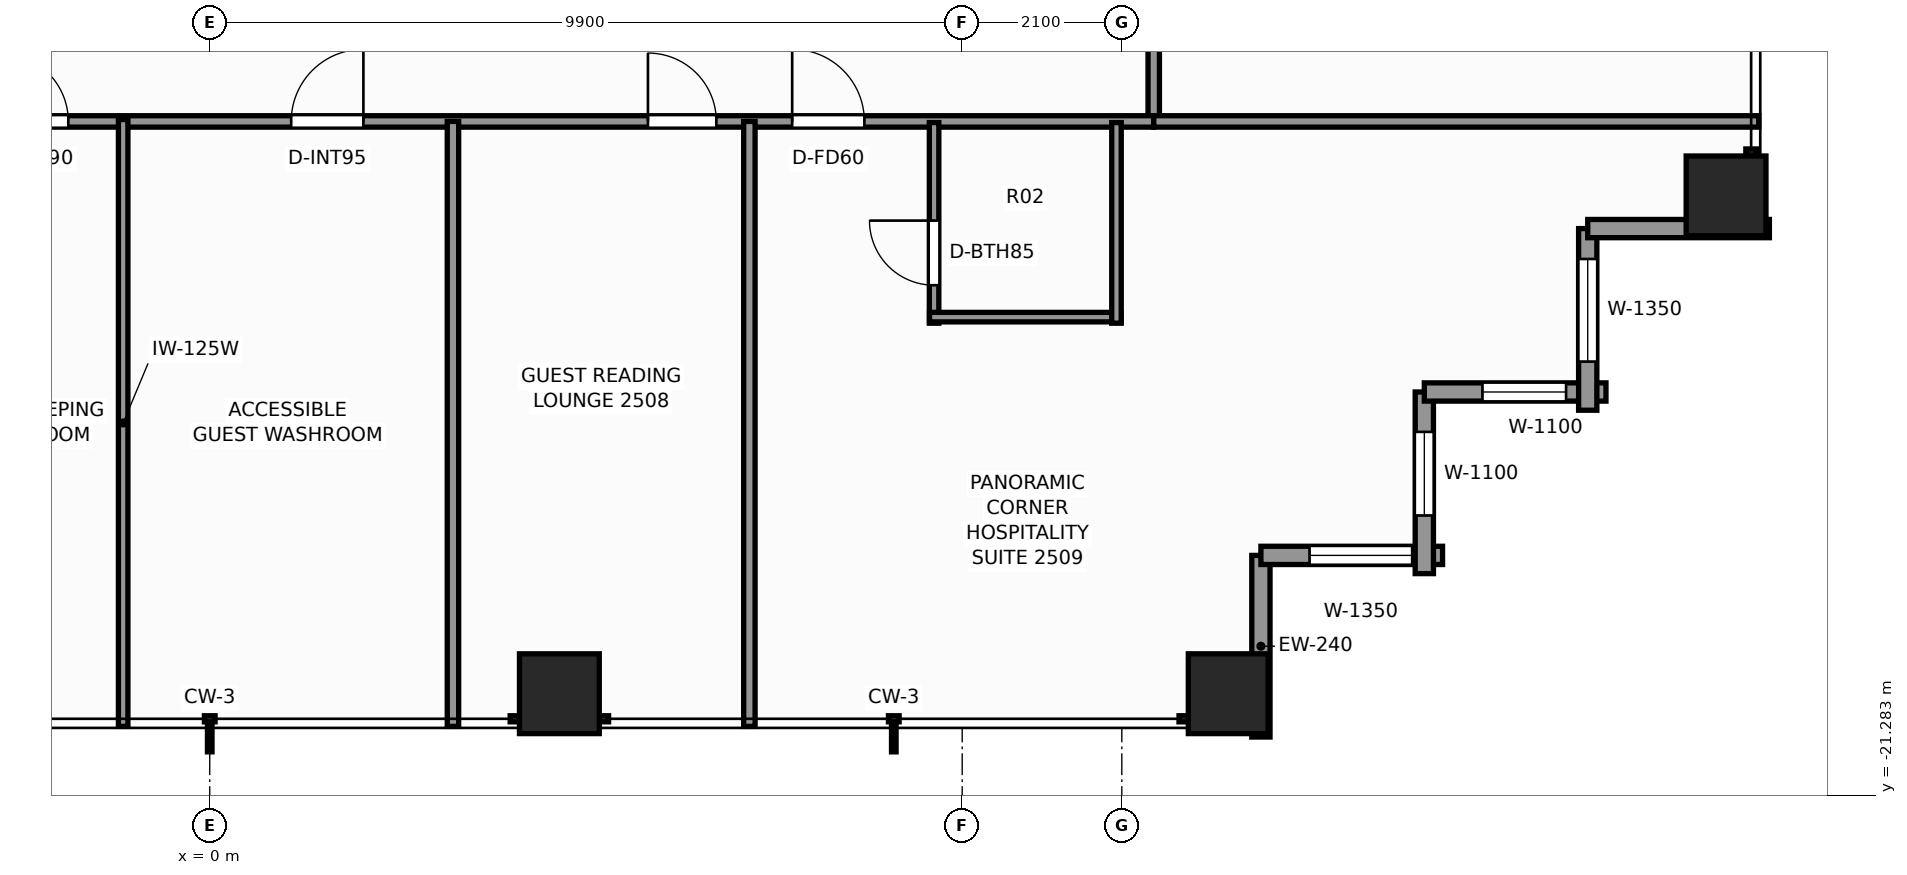
"""IFC4 building model, lengths in metres.
Left out: names, types, materials, properties, quantities, classifications, styles, units other than length and angle.
Written with IfcOpenShell. Run it as: python <this file> out.ifc"""

import sys

from ifc_helpers import new_model, si_unit, direction, frame, frame_2d, origin, origin_2d, place, context, subcontext, project, spatial, rectangle, extrude, element, fill, save


model = new_model("IFC4")
c1 = context("Model", 3, precision=1e-05, world=origin(), true_north=direction((0.0, 1.0)))
c2 = subcontext(c1, "Body", "Model", "MODEL_VIEW")
j1 = project(units=[si_unit("LENGTHUNIT", "METRE"), si_unit("PLANEANGLEUNIT", "RADIAN")], contexts=[c1])
p1 = place(None, origin())
s1 = spatial("IfcSite", under=j1, at=p1, CompositionType="ELEMENT")
p2 = place(p1, origin())
s2 = spatial("IfcBuilding", under=s1, at=p2, CompositionType="ELEMENT")
p3 = place(p2, frame((0.0, 0.0, 88.7)))
s3 = spatial("IfcBuildingStorey", under=s2, at=p3, CompositionType="ELEMENT", Elevation=88.7)
for number, where, z_axis, x_axis in (
    (1, (4.6, -19.95, 0.0), (0.0, 0.0, 1.0), (1.0, 0.0, 0.0)),
    (2, (13.4, -19.95, 0.0), (0.0, 0.0, 1.0), (1.0, 0.0, 0.0)),
    (3, (19.95, -13.4, 0.0), (0.0, 0.0, 1.0), (1.0, 0.0, 0.0)),
):
    element("IfcColumn", number, at=place(p3, frame(where, z_axis=z_axis, x_axis=x_axis)), inside=s3, PredefinedType="COLUMN", context=c2, shape_type="SweptSolid", body=[
        extrude(rectangle(XDim=1.05, YDim=1.05, at=origin_2d()), origin(), (0.0, 0.0, 1.0), 3.3),
    ])
p4 = place(p3, frame((13.83, -18.13, 0.0), z_axis=(0.0, 0.0, 1.0), x_axis=(0.0, -1.0, 0.0)))
e4 = element("IfcWall", 4, at=p4, inside=s3, PredefinedType="STANDARD", context=c2, shape_type="SweptSolid", body=[
    extrude(rectangle(XDim=2.39, YDim=0.24, at=frame_2d((1.195, 0.0))), origin(), (0.0, 0.0, 1.0), 2.459),
])
p5 = place(p3, frame((16.22, -18.13, 0.0), z_axis=(0.0, 0.0, 1.0), x_axis=(-1.0, 0.0, 0.0)))
e5 = element("IfcWall", 5, at=p5, inside=s3, PredefinedType="STANDARD", context=c2, shape_type="SweptSolid", body=[
    extrude(rectangle(XDim=2.39, YDim=0.24, at=frame_2d((1.195, 0.0))), origin(), (0.0, 0.0, 1.0), 2.459),
])
p6 = place(p5, frame((0.4, 0.0, 0.65)))
e6 = element("IfcOpeningElement", 6, at=p6, cuts=e5, PredefinedType="OPENING", context=c2, shape_type="SweptSolid", body=[
    extrude(rectangle(XDim=1.35, YDim=1.55, at=frame_2d((0.675, 0.775))), frame((0.0, 0.13, 0.0), z_axis=(0.0, -1.0, 0.0), x_axis=(1.0, 0.0, 0.0)), (0.0, 0.0, 1.0), 0.26),
])
p7 = place(p3, frame((15.98, -15.98, 0.0), z_axis=(0.0, 0.0, 1.0), x_axis=(0.0, -1.0, 0.0)))
e7 = element("IfcWall", 7, at=p7, inside=s3, PredefinedType="STANDARD", context=c2, shape_type="SweptSolid", body=[
    extrude(rectangle(XDim=2.39, YDim=0.24, at=frame_2d((1.195, 0.0))), origin(), (0.0, 0.0, 1.0), 2.459),
])
p8 = place(p7, frame((0.525, 0.0, 0.65)))
e8 = element("IfcOpeningElement", 8, at=p8, cuts=e7, PredefinedType="OPENING", context=c2, shape_type="SweptSolid", body=[
    extrude(rectangle(XDim=1.1, YDim=1.45, at=frame_2d((0.55, 0.725))), frame((0.0, 0.13, 0.0), z_axis=(0.0, -1.0, 0.0), x_axis=(1.0, 0.0, 0.0)), (0.0, 0.0, 1.0), 0.26),
])
p9 = place(p3, frame((18.37, -15.98, 0.0), z_axis=(0.0, 0.0, 1.0), x_axis=(-1.0, 0.0, 0.0)))
e9 = element("IfcWall", 9, at=p9, inside=s3, PredefinedType="STANDARD", context=c2, shape_type="SweptSolid", body=[
    extrude(rectangle(XDim=2.39, YDim=0.24, at=frame_2d((1.195, 0.0))), origin(), (0.0, 0.0, 1.0), 2.459),
])
p10 = place(p9, frame((0.525, 0.0, 0.65)))
e10 = element("IfcOpeningElement", 10, at=p10, cuts=e9, PredefinedType="OPENING", context=c2, shape_type="SweptSolid", body=[
    extrude(rectangle(XDim=1.1, YDim=1.45, at=frame_2d((0.55, 0.725))), frame((0.0, 0.13, 0.0), z_axis=(0.0, -1.0, 0.0), x_axis=(1.0, 0.0, 0.0)), (0.0, 0.0, 1.0), 0.26),
])
p11 = place(p3, frame((18.13, -13.83, 0.0), z_axis=(0.0, 0.0, 1.0), x_axis=(0.0, -1.0, 0.0)))
e11 = element("IfcWall", 11, at=p11, inside=s3, PredefinedType="STANDARD", context=c2, shape_type="SweptSolid", body=[
    extrude(rectangle(XDim=2.39, YDim=0.24, at=frame_2d((1.195, 0.0))), origin(), (0.0, 0.0, 1.0), 2.459),
])
p12 = place(p11, frame((0.4, 0.0, 0.65)))
e12 = element("IfcOpeningElement", 12, at=p12, cuts=e11, PredefinedType="OPENING", context=c2, shape_type="SweptSolid", body=[
    extrude(rectangle(XDim=1.35, YDim=1.55, at=frame_2d((0.675, 0.775))), frame((0.0, 0.13, 0.0), z_axis=(0.0, -1.0, 0.0), x_axis=(1.0, 0.0, 0.0)), (0.0, 0.0, 1.0), 0.26),
])
p13 = place(p3, frame((20.52, -13.83, 0.0), z_axis=(0.0, 0.0, 1.0), x_axis=(-1.0, 0.0, 0.0)))
e13 = element("IfcWall", 13, at=p13, inside=s3, PredefinedType="STANDARD", context=c2, shape_type="SweptSolid", body=[
    extrude(rectangle(XDim=2.39, YDim=0.24, at=frame_2d((1.195, 0.0))), origin(), (0.0, 0.0, 1.0), 2.459),
])
p14 = place(p3, frame((12.42, -12.42, 0.0), z_axis=(0.0, 0.0, 1.0), x_axis=(0.0, 1.0, 0.0)))
e14 = element("IfcWall", 14, at=p14, inside=s3, PredefinedType="PARTITIONING", context=c2, shape_type="SweptSolid", body=[
    extrude(rectangle(XDim=24.84, YDim=0.15, at=frame_2d((12.42, 0.0))), origin(), (0.0, 0.0, 1.0), 2.292),
])
p15 = place(p14, frame((4.435, 0.0, 0.0)))
e15 = element("IfcOpeningElement", 15, at=p15, cuts=e14, PredefinedType="OPENING", context=c2, shape_type="SweptSolid", body=[
    extrude(rectangle(XDim=0.9, YDim=2.06, at=frame_2d((0.45, 1.03))), frame((0.0, 0.085, 0.0), z_axis=(0.0, -1.0, 0.0), x_axis=(1.0, 0.0, 0.0)), (0.0, 0.0, 1.0), 0.17),
])
p16 = place(p14, frame((19.505, 0.0, 0.0)))
e16 = element("IfcOpeningElement", 16, at=p16, cuts=e14, PredefinedType="OPENING", context=c2, shape_type="SweptSolid", body=[
    extrude(rectangle(XDim=0.9, YDim=2.06, at=frame_2d((0.45, 1.03))), frame((0.0, 0.085, 0.0), z_axis=(0.0, -1.0, 0.0), x_axis=(1.0, 0.0, 0.0)), (0.0, 0.0, 1.0), 0.17),
])
p17 = place(p3, frame((-3.65, -12.42, 0.0), z_axis=(0.0, 0.0, 1.0), x_axis=(1.0, 0.0, 0.0)))
e17 = element("IfcWall", 17, at=p17, inside=s3, PredefinedType="PARTITIONING", context=c2, shape_type="SweptSolid", body=[
    extrude(rectangle(XDim=16.07, YDim=0.15, at=frame_2d((8.035, 0.0))), origin(), (0.0, 0.0, 1.0), 2.292),
])
p18 = place(p17, frame((0.889, 0.0, 0.0)))
e18 = element("IfcOpeningElement", 18, at=p18, cuts=e17, PredefinedType="OPENING", context=c2, shape_type="SweptSolid", body=[
    extrude(rectangle(XDim=0.9, YDim=2.06, at=frame_2d((0.45, 1.03))), frame((0.0, 0.085, 0.0), z_axis=(0.0, -1.0, 0.0), x_axis=(1.0, 0.0, 0.0)), (0.0, 0.0, 1.0), 0.17),
])
p19 = place(p17, frame((4.722, 0.0, 0.0)))
e19 = element("IfcOpeningElement", 19, at=p19, cuts=e17, PredefinedType="OPENING", context=c2, shape_type="SweptSolid", body=[
    extrude(rectangle(XDim=0.95, YDim=2.06, at=frame_2d((0.475, 1.03))), frame((0.0, 0.085, 0.0), z_axis=(0.0, -1.0, 0.0), x_axis=(1.0, 0.0, 0.0)), (0.0, 0.0, 1.0), 0.17),
])
p20 = place(p17, frame((9.415, 0.0, 0.0)))
e20 = element("IfcOpeningElement", 20, at=p20, cuts=e17, PredefinedType="OPENING", context=c2, shape_type="SweptSolid", body=[
    extrude(rectangle(XDim=0.9, YDim=2.06, at=frame_2d((0.45, 1.03))), frame((0.0, 0.085, 0.0), z_axis=(0.0, -1.0, 0.0), x_axis=(1.0, 0.0, 0.0)), (0.0, 0.0, 1.0), 0.17),
])
p21 = place(p17, frame((11.313, 0.0, 0.0)))
e21 = element("IfcOpeningElement", 21, at=p21, cuts=e17, PredefinedType="OPENING", context=c2, shape_type="SweptSolid", body=[
    extrude(rectangle(XDim=0.95, YDim=2.06, at=frame_2d((0.475, 1.03))), frame((0.0, 0.085, 0.0), z_axis=(0.0, -1.0, 0.0), x_axis=(1.0, 0.0, 0.0)), (0.0, 0.0, 1.0), 0.17),
])
p22 = place(p3, frame((12.42, -12.42, 0.0), z_axis=(0.0, 0.0, 1.0), x_axis=(1.0, 0.0, 0.0)))
e22 = element("IfcWall", 22, at=p22, inside=s3, PredefinedType="PARTITIONING", context=c2, shape_type="SweptSolid", body=[
    extrude(rectangle(XDim=7.96, YDim=0.15, at=frame_2d((3.98, 0.0))), origin(), (0.0, 0.0, 1.0), 2.292),
])
p23 = place(p3, frame((3.2, -20.38, 0.0), z_axis=(0.0, 0.0, 1.0), x_axis=(0.0, 1.0, 0.0)))
e23 = element("IfcWall", 23, at=p23, inside=s3, PredefinedType="PARTITIONING", context=c2, shape_type="SweptSolid", body=[
    extrude(rectangle(XDim=7.96, YDim=0.15, at=frame_2d((3.98, 0.0))), origin(), (0.0, 0.0, 1.0), 2.449),
])
p24 = place(p3, frame((-1.139, -20.38, 0.0), z_axis=(0.0, 0.0, 1.0), x_axis=(0.0, 1.0, 0.0)))
e24 = element("IfcWall", 24, at=p24, inside=s3, PredefinedType="PARTITIONING", context=c2, shape_type="SweptSolid", body=[
    extrude(rectangle(XDim=7.985, YDim=0.125, at=frame_2d((3.992, 0.0))), origin(), (0.0, 0.0, 1.0), 2.449),
])
p25 = place(p3, frame((7.1, -20.38, 0.0), z_axis=(0.0, 0.0, 1.0), x_axis=(0.0, 1.0, 0.0)))
e25 = element("IfcWall", 25, at=p25, inside=s3, PredefinedType="PARTITIONING", context=c2, shape_type="SweptSolid", body=[
    extrude(rectangle(XDim=7.96, YDim=0.15, at=frame_2d((3.98, 0.0))), origin(), (0.0, 0.0, 1.0), 2.449),
])
p26 = place(p3, frame((9.53, -15.075, 0.0), z_axis=(0.0, 0.0, 1.0), x_axis=(0.0, 1.0, 0.0)))
e26 = element("IfcWall", 26, at=p26, inside=s3, PredefinedType="PARTITIONING", context=c2, shape_type="SweptSolid", body=[
    extrude(rectangle(XDim=2.64, YDim=0.125, at=frame_2d((1.32, 0.0))), origin(), (0.0, 0.0, 1.0), 3.08),
])
p27 = place(p26, frame((0.5, 0.0, 0.0)))
e27 = element("IfcOpeningElement", 27, at=p27, cuts=e26, PredefinedType="OPENING", context=c2, shape_type="SweptSolid", body=[
    extrude(rectangle(XDim=0.85, YDim=2.03, at=frame_2d((0.425, 1.015))), frame((0.0, 0.073, 0.0), z_axis=(0.0, -1.0, 0.0), x_axis=(1.0, 0.0, 0.0)), (0.0, 0.0, 1.0), 0.145),
])
p28 = place(p3, frame((9.47, -14.995, 0.0), z_axis=(0.0, 0.0, 1.0), x_axis=(1.0, 0.0, 0.0)))
e28 = element("IfcWall", 28, at=p28, inside=s3, PredefinedType="PARTITIONING", context=c2, shape_type="SweptSolid", body=[
    extrude(rectangle(XDim=2.52, YDim=0.125, at=frame_2d((1.26, 0.0))), origin(), (0.0, 0.0, 1.0), 2.292),
])
p29 = place(p3, frame((11.93, -15.075, 0.0), z_axis=(0.0, 0.0, 1.0), x_axis=(0.0, 1.0, 0.0)))
e29 = element("IfcWall", 29, at=p29, inside=s3, PredefinedType="PARTITIONING", context=c2, shape_type="SweptSolid", body=[
    extrude(rectangle(XDim=2.64, YDim=0.125, at=frame_2d((1.32, 0.0))), origin(), (0.0, 0.0, 1.0), 2.292),
])
p30 = place(p6, origin())
e30 = element("IfcWindow", 30, at=p30, inside=s3, PartitioningType="SINGLE_PANEL", PredefinedType="WINDOW", context=c2, shape_type="SweptSolid", body=[
    extrude(rectangle(XDim=1.35, YDim=1.55, at=frame_2d((0.675, 0.775))), frame((0.0, 0.03, 0.0), z_axis=(0.0, -1.0, 0.0), x_axis=(1.0, 0.0, 0.0)), (0.0, 0.0, 1.0), 0.06),
])
fill(e6, e30)
p31 = place(p8, origin())
e31 = element("IfcWindow", 31, at=p31, inside=s3, PartitioningType="SINGLE_PANEL", PredefinedType="WINDOW", context=c2, shape_type="SweptSolid", body=[
    extrude(rectangle(XDim=1.1, YDim=1.45, at=frame_2d((0.55, 0.725))), frame((0.0, 0.03, 0.0), z_axis=(0.0, -1.0, 0.0), x_axis=(1.0, 0.0, 0.0)), (0.0, 0.0, 1.0), 0.06),
])
fill(e8, e31)
p32 = place(p10, origin())
e32 = element("IfcWindow", 32, at=p32, inside=s3, PartitioningType="SINGLE_PANEL", PredefinedType="WINDOW", context=c2, shape_type="SweptSolid", body=[
    extrude(rectangle(XDim=1.1, YDim=1.45, at=frame_2d((0.55, 0.725))), frame((0.0, 0.03, 0.0), z_axis=(0.0, -1.0, 0.0), x_axis=(1.0, 0.0, 0.0)), (0.0, 0.0, 1.0), 0.06),
])
fill(e10, e32)
p33 = place(p12, origin())
e33 = element("IfcWindow", 33, at=p33, inside=s3, PartitioningType="SINGLE_PANEL", PredefinedType="WINDOW", context=c2, shape_type="SweptSolid", body=[
    extrude(rectangle(XDim=1.35, YDim=1.55, at=frame_2d((0.675, 0.775))), frame((0.0, 0.03, 0.0), z_axis=(0.0, -1.0, 0.0), x_axis=(1.0, 0.0, 0.0)), (0.0, 0.0, 1.0), 0.06),
])
fill(e12, e33)
p34 = place(p18, origin())
e34 = element("IfcDoor", 34, at=p34, inside=s3, OperationType="SINGLE_SWING_LEFT", PredefinedType="DOOR", context=c2, shape_type="SweptSolid", body=[
    extrude(rectangle(XDim=0.9, YDim=2.06, at=frame_2d((0.45, 1.03))), frame((0.0, 0.025, 0.0), z_axis=(0.0, -1.0, 0.0), x_axis=(1.0, 0.0, 0.0)), (0.0, 0.0, 1.0), 0.05),
])
fill(e18, e34)
p35 = place(p19, origin())
e35 = element("IfcDoor", 35, at=p35, inside=s3, OperationType="SINGLE_SWING_RIGHT", PredefinedType="DOOR", context=c2, shape_type="SweptSolid", body=[
    extrude(rectangle(XDim=0.95, YDim=2.06, at=frame_2d((0.475, 1.03))), frame((0.0, 0.025, 0.0), z_axis=(0.0, -1.0, 0.0), x_axis=(1.0, 0.0, 0.0)), (0.0, 0.0, 1.0), 0.05),
])
fill(e19, e35)
p36 = place(p20, origin())
e36 = element("IfcDoor", 36, at=p36, inside=s3, OperationType="SINGLE_SWING_LEFT", PredefinedType="DOOR", context=c2, shape_type="SweptSolid", body=[
    extrude(rectangle(XDim=0.9, YDim=2.06, at=frame_2d((0.45, 1.03))), frame((0.0, 0.025, 0.0), z_axis=(0.0, -1.0, 0.0), x_axis=(1.0, 0.0, 0.0)), (0.0, 0.0, 1.0), 0.05),
])
fill(e20, e36)
p37 = place(p27, origin())
e37 = element("IfcDoor", 37, at=p37, inside=s3, OperationType="SINGLE_SWING_RIGHT", PredefinedType="DOOR", context=c2, shape_type="SweptSolid", body=[
    extrude(rectangle(XDim=0.85, YDim=2.03, at=frame_2d((0.425, 1.015))), frame((0.0, 0.025, 0.0), z_axis=(0.0, -1.0, 0.0), x_axis=(1.0, 0.0, 0.0)), (0.0, 0.0, 1.0), 0.05),
])
fill(e27, e37)
p38 = place(p21, origin())
e38 = element("IfcDoor", 38, at=p38, inside=s3, OperationType="SINGLE_SWING_LEFT", PredefinedType="DOOR", context=c2, shape_type="SweptSolid", body=[
    extrude(rectangle(XDim=0.95, YDim=2.06, at=frame_2d((0.475, 1.03))), frame((0.0, 0.025, 0.0), z_axis=(0.0, -1.0, 0.0), x_axis=(1.0, 0.0, 0.0)), (0.0, 0.0, 1.0), 0.05),
])
fill(e21, e38)
save(model, sys.argv[1])
